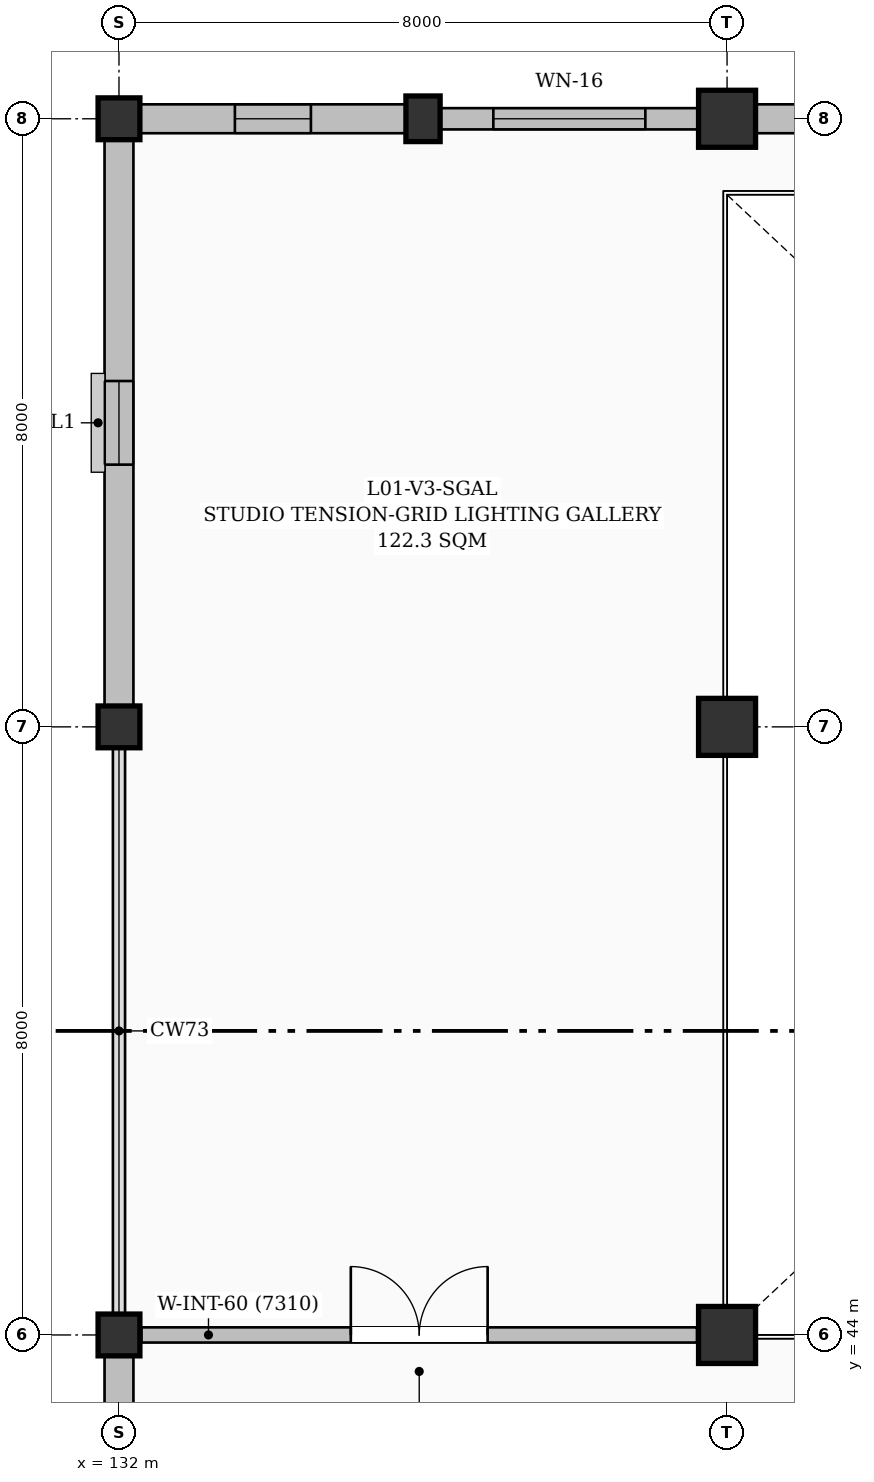
"""IFC4 building model, lengths in metres.
Left out: names, types, materials, properties, quantities, classifications, styles, units other than length and angle.
Written with IfcOpenShell. Run it as: python <this file> out.ifc"""

import sys

from ifc_helpers import new_model, si_unit, direction, frame, frame_2d, origin, origin_2d, place, context, subcontext, project, spatial, rectangle, extrude, element, fill, save


model = new_model("IFC4")
c1 = context("Model", 3, precision=1e-05, world=origin(), true_north=direction((0.0, 1.0)))
c2 = subcontext(c1, "Body", "Model", "MODEL_VIEW")
j1 = project(units=[si_unit("LENGTHUNIT", "METRE"), si_unit("PLANEANGLEUNIT", "RADIAN")], contexts=[c1])
p1 = place(None, origin())
s1 = spatial("IfcSite", under=j1, at=p1, CompositionType="ELEMENT")
p2 = place(p1, origin())
s2 = spatial("IfcBuilding", under=s1, at=p2, CompositionType="ELEMENT")
p3 = place(p2, frame((0.0, 0.0, 4.8)))
s3 = spatial("IfcBuildingStorey", under=s2, at=p3, CompositionType="ELEMENT", Elevation=4.8)
for number, where, z_axis, x_axis in (
    (1, (132.0, 44.0, 0.0), (0.0, 0.0, 1.0), (1.0, 0.0, 0.0)),
    (2, (132.0, 52.0, 0.0), (0.0, 0.0, 1.0), (1.0, 0.0, 0.0)),
    (3, (132.0, 60.0, 0.0), (0.0, 0.0, 1.0), (1.0, 0.0, 0.0)),
):
    element("IfcColumn", number, at=place(p3, frame(where, z_axis=z_axis, x_axis=x_axis)), inside=s3, PredefinedType="COLUMN", context=c2, shape_type="SweptSolid", body=[
        extrude(rectangle(XDim=0.55, YDim=0.55, at=origin_2d()), origin(), (0.0, 0.0, 1.0), 4.5),
    ])
p4 = place(p3, frame((136.0, 60.0, 0.0), z_axis=(0.0, 0.0, 1.0), x_axis=(1.0, 0.0, 0.0)))
e4 = element("IfcColumn", 4, at=p4, inside=s3, PredefinedType="PILASTER", context=c2, shape_type="SweptSolid", body=[
    extrude(rectangle(XDim=0.45, YDim=0.6, at=origin_2d()), origin(), (0.0, 0.0, 1.0), 4.5),
])
for number, where, z_axis, x_axis in (
    (5, (140.0, 44.0, 0.0), (0.0, 0.0, 1.0), (1.0, 0.0, 0.0)),
    (6, (140.0, 52.0, 0.0), (0.0, 0.0, 1.0), (1.0, 0.0, 0.0)),
    (7, (140.0, 60.0, 0.0), (0.0, 0.0, 1.0), (1.0, 0.0, 0.0)),
):
    element("IfcColumn", number, at=place(p3, frame(where, z_axis=z_axis, x_axis=x_axis)), inside=s3, PredefinedType="COLUMN", context=c2, shape_type="SweptSolid", body=[
        extrude(rectangle(XDim=0.75, YDim=0.75, at=origin_2d()), origin(), (0.0, 0.0, 1.0), 4.5),
    ])
p5 = place(p3, frame((132.0, 36.275, 0.0), z_axis=(0.0, 0.0, 1.0), x_axis=(0.0, 1.0, 0.0)))
e8 = element("IfcWall", 8, at=p5, inside=s3, PredefinedType="SOLIDWALL", context=c2, shape_type="SweptSolid", body=[
    extrude(rectangle(XDim=7.45, YDim=0.38, at=frame_2d((3.725, 0.0))), origin(), (0.0, 0.0, 1.0), 4.25),
])
p6 = place(p5, frame((3.225, 0.0, 0.95)))
e9 = element("IfcOpeningElement", 9, at=p6, cuts=e8, PredefinedType="OPENING", context=c2, shape_type="SweptSolid", body=[
    extrude(rectangle(XDim=1.0, YDim=1.4, at=frame_2d((0.5, 0.7))), frame((0.0, 0.2, 0.0), z_axis=(0.0, -1.0, 0.0), x_axis=(1.0, 0.0, 0.0)), (0.0, 0.0, 1.0), 0.4),
])
p7 = place(p3, frame((132.0, 52.275, 0.0), z_axis=(0.0, 0.0, 1.0), x_axis=(0.0, 1.0, 0.0)))
e10 = element("IfcWall", 10, at=p7, inside=s3, PredefinedType="SOLIDWALL", context=c2, shape_type="SweptSolid", body=[
    extrude(rectangle(XDim=7.45, YDim=0.38, at=frame_2d((3.725, 0.0))), origin(), (0.0, 0.0, 1.0), 4.25),
])
p8 = place(p7, frame((3.175, 0.0, 0.95)))
e11 = element("IfcOpeningElement", 11, at=p8, cuts=e10, PredefinedType="OPENING", context=c2, shape_type="SweptSolid", body=[
    extrude(rectangle(XDim=1.1, YDim=2.0, at=frame_2d((0.55, 1.0))), frame((0.0, 0.2, 0.0), z_axis=(0.0, -1.0, 0.0), x_axis=(1.0, 0.0, 0.0)), (0.0, 0.0, 1.0), 0.4),
])
p9 = place(p3, frame((132.275, 60.0, 0.0), z_axis=(0.0, 0.0, 1.0), x_axis=(1.0, 0.0, 0.0)))
e12 = element("IfcWall", 12, at=p9, inside=s3, PredefinedType="SOLIDWALL", context=c2, shape_type="SweptSolid", body=[
    extrude(rectangle(XDim=3.5, YDim=0.38, at=frame_2d((1.75, 0.0))), origin(), (0.0, 0.0, 1.0), 4.25),
])
p10 = place(p9, frame((1.25, 0.0, 0.95)))
e13 = element("IfcOpeningElement", 13, at=p10, cuts=e12, PredefinedType="OPENING", context=c2, shape_type="SweptSolid", body=[
    extrude(rectangle(XDim=1.0, YDim=1.4, at=frame_2d((0.5, 0.7))), frame((0.0, 0.2, 0.0), z_axis=(0.0, -1.0, 0.0), x_axis=(1.0, 0.0, 0.0)), (0.0, 0.0, 1.0), 0.4),
])
p11 = place(p3, frame((136.225, 60.0, 0.0), z_axis=(0.0, 0.0, 1.0), x_axis=(1.0, 0.0, 0.0)))
e14 = element("IfcWall", 14, at=p11, inside=s3, PredefinedType="SOLIDWALL", context=c2, shape_type="SweptSolid", body=[
    extrude(rectangle(XDim=3.4, YDim=0.28, at=frame_2d((1.7, 0.0))), origin(), (0.0, 0.0, 1.0), 4.25),
])
p12 = place(p11, frame((0.7, 0.0, 0.95)))
e15 = element("IfcOpeningElement", 15, at=p12, cuts=e14, PredefinedType="OPENING", context=c2, shape_type="SweptSolid", body=[
    extrude(rectangle(XDim=2.0, YDim=1.2, at=frame_2d((1.0, 0.6))), frame((0.0, 0.15, 0.0), z_axis=(0.0, -1.0, 0.0), x_axis=(1.0, 0.0, 0.0)), (0.0, 0.0, 1.0), 0.3),
])
p13 = place(p3, frame((140.375, 60.0, 0.0), z_axis=(0.0, 0.0, 1.0), x_axis=(1.0, 0.0, 0.0)))
e16 = element("IfcWall", 16, at=p13, inside=s3, PredefinedType="SOLIDWALL", context=c2, shape_type="SweptSolid", body=[
    extrude(rectangle(XDim=3.425, YDim=0.38, at=frame_2d((1.712, 0.0))), origin(), (0.0, 0.0, 1.0), 3.735),
])
p14 = place(p13, frame((1.163, 0.0, 0.95)))
e17 = element("IfcOpeningElement", 17, at=p14, cuts=e16, PredefinedType="OPENING", context=c2, shape_type="SweptSolid", body=[
    extrude(rectangle(XDim=1.1, YDim=2.0, at=frame_2d((0.55, 1.0))), frame((0.0, 0.2, 0.0), z_axis=(0.0, -1.0, 0.0), x_axis=(1.0, 0.0, 0.0)), (0.0, 0.0, 1.0), 0.4),
])
p15 = place(p3, frame((132.295, 44.0, 0.0), z_axis=(0.0, 0.0, 1.0), x_axis=(1.0, 0.0, 0.0)))
e18 = element("IfcWall", 18, at=p15, inside=s3, PredefinedType="PARTITIONING", context=c2, shape_type="SweptSolid", body=[
    extrude(rectangle(XDim=7.31, YDim=0.2, at=frame_2d((3.655, 0.0))), origin(), (0.0, 0.0, 1.0), 4.25),
])
p16 = place(p15, frame((2.755, 0.0, 0.0)))
e19 = element("IfcOpeningElement", 19, at=p16, cuts=e18, PredefinedType="OPENING", context=c2, shape_type="SweptSolid", body=[
    extrude(rectangle(XDim=1.8, YDim=2.35, at=frame_2d((0.9, 1.175))), frame((0.0, 0.11, 0.0), z_axis=(0.0, -1.0, 0.0), x_axis=(1.0, 0.0, 0.0)), (0.0, 0.0, 1.0), 0.22),
])
p17 = place(p8, origin())
e20 = element("IfcWindow", 20, at=p17, inside=s3, PartitioningType="SINGLE_PANEL", PredefinedType="WINDOW", context=c2, shape_type="SweptSolid", body=[
    extrude(rectangle(XDim=1.1, YDim=2.0, at=frame_2d((0.55, 1.0))), frame((0.0, 0.03, 0.0), z_axis=(0.0, -1.0, 0.0), x_axis=(1.0, 0.0, 0.0)), (0.0, 0.0, 1.0), 0.06),
])
fill(e11, e20)
p18 = place(p10, origin())
e21 = element("IfcWindow", 21, at=p18, inside=s3, PartitioningType="SINGLE_PANEL", PredefinedType="WINDOW", context=c2, shape_type="SweptSolid", body=[
    extrude(rectangle(XDim=1.0, YDim=1.4, at=frame_2d((0.5, 0.7))), frame((0.0, 0.03, 0.0), z_axis=(0.0, -1.0, 0.0), x_axis=(1.0, 0.0, 0.0)), (0.0, 0.0, 1.0), 0.06),
])
fill(e13, e21)
p19 = place(p12, origin())
e22 = element("IfcWindow", 22, at=p19, inside=s3, PartitioningType="DOUBLE_PANEL_HORIZONTAL", PredefinedType="WINDOW", context=c2, shape_type="SweptSolid", body=[
    extrude(rectangle(XDim=2.0, YDim=1.2, at=frame_2d((1.0, 0.6))), frame((0.0, 0.03, 0.0), z_axis=(0.0, -1.0, 0.0), x_axis=(1.0, 0.0, 0.0)), (0.0, 0.0, 1.0), 0.06),
])
fill(e15, e22)
p20 = place(p16, origin())
e23 = element("IfcDoor", 23, at=p20, inside=s3, OperationType="DOUBLE_DOOR_SINGLE_SWING", PredefinedType="DOOR", context=c2, shape_type="SweptSolid", body=[
    extrude(rectangle(XDim=1.8, YDim=2.35, at=frame_2d((0.9, 1.175))), frame((0.0, 0.025, 0.0), z_axis=(0.0, -1.0, 0.0), x_axis=(1.0, 0.0, 0.0)), (0.0, 0.0, 1.0), 0.05),
])
fill(e19, e23)
save(model, sys.argv[1])
